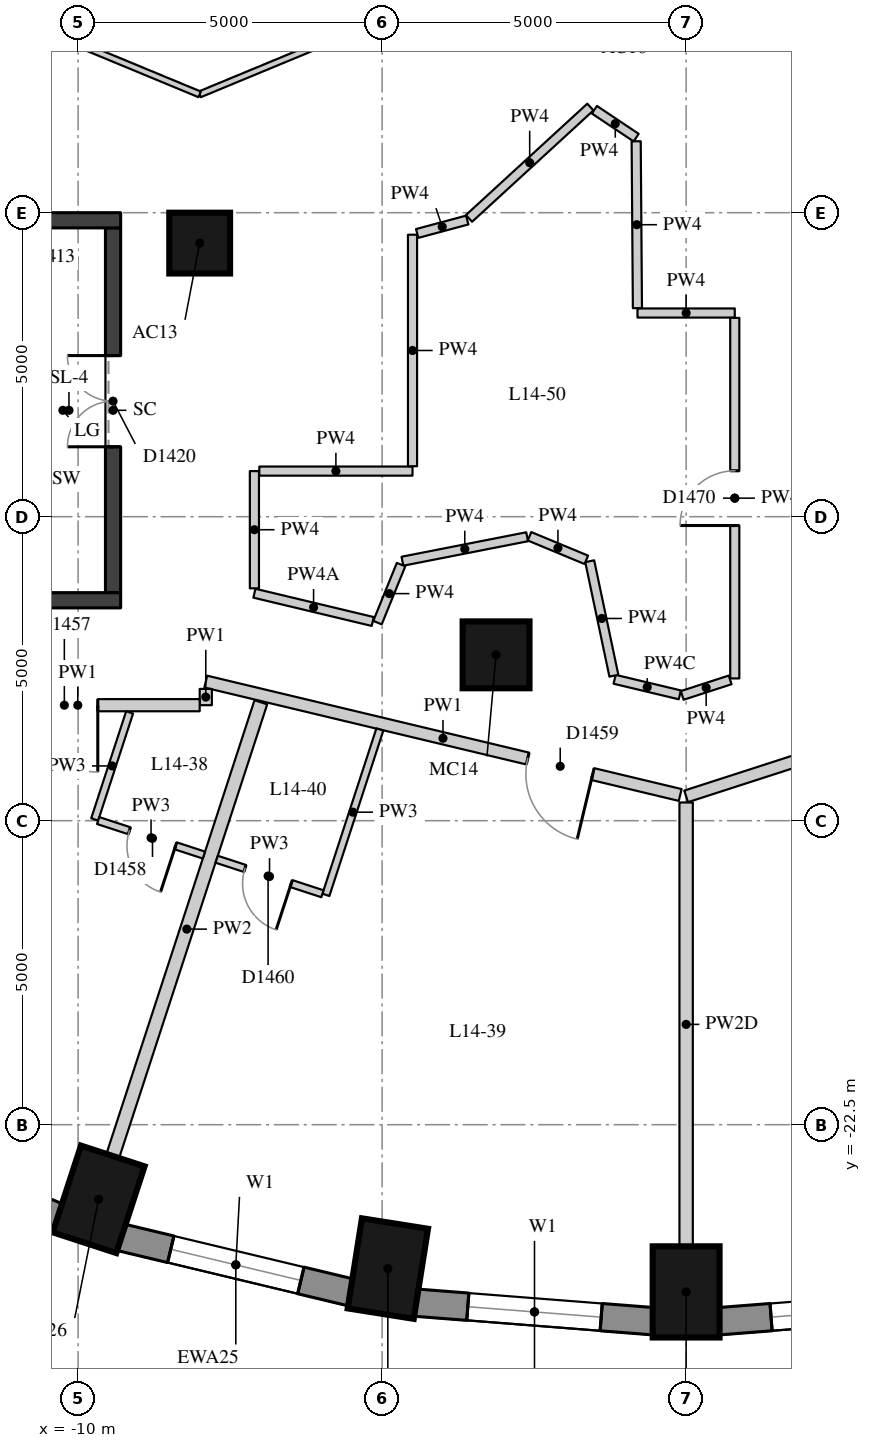
"""IFC4 building model, lengths in metres.
Left out: names, types, materials, properties, quantities, classifications, styles, units other than length and angle.
Written with IfcOpenShell. Run it as: python <this file> out.ifc"""

import sys

from ifc_helpers import new_model, si_unit, direction, frame, frame_2d, origin, origin_2d, place, context, subcontext, project, spatial, rectangle, extrude, element, fill, save


model = new_model("IFC4")
c1 = context("Model", 3, precision=1e-05, world=origin(), true_north=direction((0.0, 1.0)))
c2 = subcontext(c1, "Body", "Model", "MODEL_VIEW")
j1 = project(units=[si_unit("LENGTHUNIT", "METRE"), si_unit("PLANEANGLEUNIT", "RADIAN")], contexts=[c1])
p1 = place(None, origin())
s1 = spatial("IfcSite", under=j1, at=p1, CompositionType="ELEMENT")
p2 = place(p1, origin())
s2 = spatial("IfcBuilding", under=s1, at=p2, CompositionType="ELEMENT")
p3 = place(p2, frame((0.0, 0.0, 54.7)))
s3 = spatial("IfcBuildingStorey", under=s2, at=p3, CompositionType="ELEMENT", Elevation=54.7)
for number, where, z_axis, x_axis in (
    (1, (-9.662, -23.727, 0.0), (0.0, 0.0, 1.0), (-0.31, -0.951, 0.0)),
    (2, (-4.906, -24.866, 0.0), (0.0, 0.0, 1.0), (-0.156, -0.988, 0.0)),
    (3, (0.0, -25.25, 0.0), (0.0, 0.0, 1.0), (0.0, -1.0, 0.0)),
):
    element("IfcColumn", number, at=place(p3, frame(where, z_axis=z_axis, x_axis=x_axis)), inside=s3, PredefinedType="COLUMN", context=c2, shape_type="SweptSolid", body=[
        extrude(rectangle(XDim=1.5, YDim=1.1, at=origin_2d()), origin(), (0.0, 0.0, 1.0), 3.3),
    ])
p4 = place(p3, frame((-8.0, -8.0, 0.0), z_axis=(0.0, 0.0, 1.0), x_axis=(1.0, 0.0, 0.0)))
e4 = element("IfcColumn", 4, at=p4, inside=s3, PredefinedType="COLUMN", context=c2, shape_type="SweptSolid", body=[
    extrude(rectangle(XDim=1.0, YDim=1.0, at=origin_2d()), origin(), (0.0, 0.0, 1.0), 3.3),
])
p5 = place(p3, frame((-3.126, -14.772, 0.0), z_axis=(0.0, 0.0, 1.0), x_axis=(1.0, 0.0, 0.0)))
e5 = element("IfcColumn", 5, at=p5, inside=s3, PredefinedType="COLUMN", context=c2, shape_type="SweptSolid", body=[
    extrude(rectangle(XDim=1.1, YDim=1.1, at=origin_2d()), origin(), (0.0, 0.0, 1.0), 3.3),
])
p6 = place(p3, frame((-13.875, -22.537, 0.0), z_axis=(0.0, 0.0, 1.0), x_axis=(0.923031964282, -0.384723267966, 0.0)))
e6 = element("IfcWall", 6, at=p6, inside=s3, PredefinedType="SOLIDWALL", context=c2, shape_type="SweptSolid", body=[
    extrude(rectangle(XDim=3.856, YDim=0.45, at=frame_2d((1.928, 0.0))), origin(), (0.0, 0.0, 1.0), 3.02),
])
p7 = place(p6, frame((0.828, 0.0, 0.4)))
e7 = element("IfcOpeningElement", 7, at=p7, cuts=e6, PredefinedType="OPENING", context=c2, shape_type="SweptSolid", body=[
    extrude(rectangle(XDim=2.2, YDim=1.75, at=frame_2d((1.1, 0.875))), frame((0.0, 0.235, 0.0), z_axis=(0.0, -1.0, 0.0), x_axis=(1.0, 0.0, 0.0)), (0.0, 0.0, 1.0), 0.47),
])
p8 = place(p3, frame((-9.308, -24.35, 0.0), z_axis=(0.0, 0.0, 1.0), x_axis=(0.972496561493, -0.232917233979, 0.0)))
e8 = element("IfcWall", 8, at=p8, inside=s3, PredefinedType="SOLIDWALL", context=c2, shape_type="SweptSolid", body=[
    extrude(rectangle(XDim=3.911, YDim=0.45, at=frame_2d((1.956, 0.0))), origin(), (0.0, 0.0, 1.0), 3.02),
])
p9 = place(p8, frame((0.855, 0.0, 0.4)))
e9 = element("IfcOpeningElement", 9, at=p9, cuts=e8, PredefinedType="OPENING", context=c2, shape_type="SweptSolid", body=[
    extrude(rectangle(XDim=2.2, YDim=1.75, at=frame_2d((1.1, 0.875))), frame((0.0, 0.235, 0.0), z_axis=(0.0, -1.0, 0.0), x_axis=(1.0, 0.0, 0.0)), (0.0, 0.0, 1.0), 0.47),
])
p10 = place(p3, frame((-4.457, -25.426, 0.0), z_axis=(0.0, 0.0, 1.0), x_axis=(0.996955972145, -0.077966592873, 0.0)))
e10 = element("IfcWall", 10, at=p10, inside=s3, PredefinedType="SOLIDWALL", context=c2, shape_type="SweptSolid", body=[
    extrude(rectangle(XDim=3.939, YDim=0.45, at=frame_2d((1.97, 0.0))), origin(), (0.0, 0.0, 1.0), 3.02),
])
p11 = place(p10, frame((0.87, 0.0, 0.4)))
e11 = element("IfcOpeningElement", 11, at=p11, cuts=e10, PredefinedType="OPENING", context=c2, shape_type="SweptSolid", body=[
    extrude(rectangle(XDim=2.2, YDim=1.75, at=frame_2d((1.1, 0.875))), frame((0.0, 0.235, 0.0), z_axis=(0.0, -1.0, 0.0), x_axis=(1.0, 0.0, 0.0)), (0.0, 0.0, 1.0), 0.47),
])
p12 = place(p3, frame((0.53, -25.733, 0.0), z_axis=(0.0, 0.0, 1.0), x_axis=(0.996955972145, 0.077966592873, 0.0)))
e12 = element("IfcWall", 12, at=p12, inside=s3, PredefinedType="SOLIDWALL", context=c2, shape_type="SweptSolid", body=[
    extrude(rectangle(XDim=3.939, YDim=0.45, at=frame_2d((1.97, 0.0))), origin(), (0.0, 0.0, 1.0), 3.02),
])
p13 = place(p12, frame((0.87, 0.0, 0.4)))
e13 = element("IfcOpeningElement", 13, at=p13, cuts=e12, PredefinedType="OPENING", context=c2, shape_type="SweptSolid", body=[
    extrude(rectangle(XDim=2.2, YDim=1.75, at=frame_2d((1.1, 0.875))), frame((0.0, 0.235, 0.0), z_axis=(0.0, -1.0, 0.0), x_axis=(1.0, 0.0, 0.0)), (0.0, 0.0, 1.0), 0.47),
])
p14 = place(p3, frame((-9.425, -13.75, -0.28), z_axis=(0.0, 0.0, 1.0), x_axis=(0.0, 1.0, 0.0)))
e14 = element("IfcWall", 14, at=p14, inside=s3, PredefinedType="SHEAR", context=c2, shape_type="SweptSolid", body=[
    extrude(rectangle(XDim=6.0, YDim=0.25, at=frame_2d((3.0, 0.0))), origin(), (0.0, 0.0, 1.0), 3.3),
])
p15 = place(p14, frame((2.4, 0.0, 0.28)))
e15 = element("IfcOpeningElement", 15, at=p15, cuts=e14, PredefinedType="OPENING", context=c2, shape_type="SweptSolid", body=[
    extrude(rectangle(XDim=1.5, YDim=2.1, at=frame_2d((0.75, 1.05))), frame((0.0, 0.135, 0.0), z_axis=(0.0, -1.0, 0.0), x_axis=(1.0, 0.0, 0.0)), (0.0, 0.0, 1.0), 0.27),
])
for number, where, z_axis, x_axis in (
    (16, (-14.5, -7.625, -0.28), (0.0, 0.0, 1.0), (1.0, 0.0, 0.0)),
    (17, (-14.5, -13.875, -0.28), (0.0, 0.0, 1.0), (1.0, 0.0, 0.0)),
):
    element("IfcWall", number, at=place(p3, frame(where, z_axis=z_axis, x_axis=x_axis)), inside=s3, PredefinedType="SHEAR", context=c2, shape_type="SweptSolid", body=[
        extrude(rectangle(XDim=5.2, YDim=0.25, at=frame_2d((2.6, 0.0))), origin(), (0.0, 0.0, 1.0), 3.3),
    ])
p16 = place(p3, frame((10.792, -13.612, 0.0), z_axis=(0.0, 0.0, 1.0), x_axis=(-0.951542928403, -0.307515943336, 0.0)))
e18 = element("IfcWall", 18, at=p16, inside=s3, PredefinedType="PARTITIONING", context=c2, shape_type="SweptSolid", body=[
    extrude(rectangle(XDim=11.342, YDim=0.2, at=frame_2d((5.671, 0.0))), origin(), (0.0, 0.0, 1.0), 3.02),
])
p17 = place(p16, frame((3.239, 0.0, 0.0)))
e19 = element("IfcOpeningElement", 19, at=p17, cuts=e18, PredefinedType="OPENING", context=c2, shape_type="SweptSolid", body=[
    extrude(rectangle(XDim=1.1, YDim=2.1, at=frame_2d((0.55, 1.05))), frame((0.0, 0.11, 0.0), z_axis=(0.0, -1.0, 0.0), x_axis=(1.0, 0.0, 0.0)), (0.0, 0.0, 1.0), 0.22),
])
p18 = place(p3, frame((-0.098, -17.077, 0.0), z_axis=(0.0, 0.0, 1.0), x_axis=(-0.972607318404, 0.232454305588, 0.0)))
e20 = element("IfcWall", 20, at=p18, inside=s3, PredefinedType="PARTITIONING", context=c2, shape_type="SweptSolid", body=[
    extrude(rectangle(XDim=8.022, YDim=0.2, at=frame_2d((4.011, 0.0))), origin(), (0.0, 0.0, 1.0), 3.02),
])
p19 = place(p18, frame((1.479, 0.0, 0.0)))
e21 = element("IfcOpeningElement", 21, at=p19, cuts=e20, PredefinedType="OPENING", context=c2, shape_type="SweptSolid", body=[
    extrude(rectangle(XDim=1.1, YDim=2.1, at=frame_2d((0.55, 1.05))), frame((0.0, 0.11, 0.0), z_axis=(0.0, -1.0, 0.0), x_axis=(1.0, 0.0, 0.0)), (0.0, 0.0, 1.0), 0.22),
])
p20 = place(p3, frame((-7.9, -15.332, 0.0), z_axis=(0.0, 0.0, 1.0), x_axis=(0.0, -1.0, 0.0)))
e22 = element("IfcWall", 22, at=p20, inside=s3, PredefinedType="PARTITIONING", context=c2, shape_type="SweptSolid", body=[
    extrude(rectangle(XDim=0.268, YDim=0.2, at=frame_2d((0.134, 0.0))), origin(), (0.0, 0.0, 1.0), 3.02),
])
p21 = place(p3, frame((-8.0, -15.6, 0.0), z_axis=(0.0, 0.0, 1.0), x_axis=(-1.0, 0.0, 0.0)))
e23 = element("IfcWall", 23, at=p21, inside=s3, PredefinedType="PARTITIONING", context=c2, shape_type="SweptSolid", body=[
    extrude(rectangle(XDim=4.009, YDim=0.2, at=frame_2d((2.005, 0.0))), origin(), (0.0, 0.0, 1.0), 3.02),
])
p22 = place(p21, frame((1.676, 0.0, 0.0)))
e24 = element("IfcOpeningElement", 24, at=p22, cuts=e23, PredefinedType="OPENING", context=c2, shape_type="SweptSolid", body=[
    extrude(rectangle(XDim=1.1, YDim=2.1, at=frame_2d((0.55, 1.05))), frame((0.0, 0.11, 0.0), z_axis=(0.0, -1.0, 0.0), x_axis=(1.0, 0.0, 0.0)), (0.0, 0.0, 1.0), 0.22),
])
p23 = place(p3, frame((-0.8, -9.15, 0.0), z_axis=(0.0, 0.0, 1.0), x_axis=(1.0, 0.0, 0.0)))
e25 = element("IfcWall", 25, at=p23, inside=s3, PredefinedType="PARTITIONING", context=c2, shape_type="SweptSolid", body=[
    extrude(rectangle(XDim=1.6, YDim=0.15, at=frame_2d((0.8, 0.0))), origin(), (0.0, 0.0, 1.0), 3.02),
])
p24 = place(p3, frame((0.8, -9.23, 0.0), z_axis=(0.0, 0.0, 1.0), x_axis=(0.0, -1.0, 0.0)))
e26 = element("IfcWall", 26, at=p24, inside=s3, PredefinedType="PARTITIONING", context=c2, shape_type="SweptSolid", body=[
    extrude(rectangle(XDim=5.93, YDim=0.15, at=frame_2d((2.965, 0.0))), origin(), (0.0, 0.0, 1.0), 3.02),
])
p25 = place(p24, frame((2.515, 0.0, 0.0)))
e27 = element("IfcOpeningElement", 27, at=p25, cuts=e26, PredefinedType="OPENING", context=c2, shape_type="SweptSolid", body=[
    extrude(rectangle(XDim=0.9, YDim=2.1, at=frame_2d((0.45, 1.05))), frame((0.0, 0.085, 0.0), z_axis=(0.0, -1.0, 0.0), x_axis=(1.0, 0.0, 0.0)), (0.0, 0.0, 1.0), 0.17),
])
p26 = place(p3, frame((0.724, -15.184, 0.0), z_axis=(0.0, 0.0, 1.0), x_axis=(-0.951444518554, -0.307820285415, 0.0)))
e28 = element("IfcWall", 28, at=p26, inside=s3, PredefinedType="PARTITIONING", context=c2, shape_type="SweptSolid", body=[
    extrude(rectangle(XDim=0.829, YDim=0.15, at=frame_2d((0.415, 0.0))), origin(), (0.0, 0.0, 1.0), 3.02),
])
p27 = place(p3, frame((-0.104, -15.43, 0.0), z_axis=(0.0, 0.0, 1.0), x_axis=(-0.972630060885, 0.232359128642, 0.0)))
e29 = element("IfcWall", 29, at=p27, inside=s3, PredefinedType="PARTITIONING", context=c2, shape_type="SweptSolid", body=[
    extrude(rectangle(XDim=1.102, YDim=0.15, at=frame_2d((0.551, 0.0))), origin(), (0.0, 0.0, 1.0), 2.42),
])
p28 = place(p3, frame((-1.188, -15.115, 0.0), z_axis=(0.0, 0.0, 1.0), x_axis=(-0.20649628494, 0.978447384536, 0.0)))
e30 = element("IfcWall", 30, at=p28, inside=s3, PredefinedType="PARTITIONING", context=c2, shape_type="SweptSolid", body=[
    extrude(rectangle(XDim=1.925, YDim=0.15, at=frame_2d((0.962, 0.0))), origin(), (0.0, 0.0, 1.0), 3.02),
])
p29 = place(p3, frame((-1.641, -13.209, 0.0), z_axis=(0.0, 0.0, 1.0), x_axis=(-0.923725449546, 0.383055209937, 0.0)))
e31 = element("IfcWall", 31, at=p29, inside=s3, PredefinedType="PARTITIONING", context=c2, shape_type="SweptSolid", body=[
    extrude(rectangle(XDim=1.011, YDim=0.15, at=frame_2d((0.506, 0.0))), origin(), (0.0, 0.0, 1.0), 3.02),
])
p30 = place(p3, frame((-2.615, -12.83, 0.0), z_axis=(0.0, 0.0, 1.0), x_axis=(-0.981297312652, -0.192498270593, 0.0)))
e32 = element("IfcWall", 32, at=p30, inside=s3, PredefinedType="PARTITIONING", context=c2, shape_type="SweptSolid", body=[
    extrude(rectangle(XDim=2.09, YDim=0.15, at=frame_2d((1.045, 0.0))), origin(), (0.0, 0.0, 1.0), 3.02),
])
p31 = place(p3, frame((-4.688, -13.288, 0.0), z_axis=(0.0, 0.0, 1.0), x_axis=(-0.375963709287, -0.926634388148, 0.0)))
e33 = element("IfcWall", 33, at=p31, inside=s3, PredefinedType="PARTITIONING", context=c2, shape_type="SweptSolid", body=[
    extrude(rectangle(XDim=1.03, YDim=0.15, at=frame_2d((0.515, 0.0))), origin(), (0.0, 0.0, 1.0), 3.02),
])
p32 = place(p3, frame((-5.154, -14.224, 0.0), z_axis=(0.0, 0.0, 1.0), x_axis=(-0.97258848944, 0.232533073366, 0.0)))
e34 = element("IfcWall", 34, at=p32, inside=s3, PredefinedType="PARTITIONING", context=c2, shape_type="SweptSolid", body=[
    extrude(rectangle(XDim=2.001, YDim=0.15, at=frame_2d((1.0, 0.0))), origin(), (0.0, 0.0, 1.0), 2.57),
])
p33 = place(p3, frame((-7.1, -13.678, 0.0), z_axis=(0.0, 0.0, 1.0), x_axis=(0.0, 1.0, 0.0)))
e35 = element("IfcWall", 35, at=p33, inside=s3, PredefinedType="PARTITIONING", context=c2, shape_type="SweptSolid", body=[
    extrude(rectangle(XDim=1.928, YDim=0.15, at=frame_2d((0.964, 0.0))), origin(), (0.0, 0.0, 1.0), 3.02),
])
p34 = place(p3, frame((-7.02, -11.75, 0.0), z_axis=(0.0, 0.0, 1.0), x_axis=(1.0, 0.0, 0.0)))
e36 = element("IfcWall", 36, at=p34, inside=s3, PredefinedType="PARTITIONING", context=c2, shape_type="SweptSolid", body=[
    extrude(rectangle(XDim=2.52, YDim=0.15, at=frame_2d((1.26, 0.0))), origin(), (0.0, 0.0, 1.0), 3.02),
])
p35 = place(p3, frame((-4.5, -11.67, 0.0), z_axis=(0.0, 0.0, 1.0), x_axis=(0.0, 1.0, 0.0)))
e37 = element("IfcWall", 37, at=p35, inside=s3, PredefinedType="PARTITIONING", context=c2, shape_type="SweptSolid", body=[
    extrude(rectangle(XDim=3.808, YDim=0.15, at=frame_2d((1.904, 0.0))), origin(), (0.0, 0.0, 1.0), 3.02),
])
p36 = place(p3, frame((-4.423, -7.842, 0.0), z_axis=(0.0, 0.0, 1.0), x_axis=(0.965853333569, 0.259089440221, 0.0)))
e38 = element("IfcWall", 38, at=p36, inside=s3, PredefinedType="PARTITIONING", context=c2, shape_type="SweptSolid", body=[
    extrude(rectangle(XDim=0.852, YDim=0.15, at=frame_2d((0.426, 0.0))), origin(), (0.0, 0.0, 1.0), 3.02),
])
p37 = place(p3, frame((-3.571, -7.594, 0.0), z_axis=(0.0, 0.0, 1.0), x_axis=(0.736783660812, 0.676128565555, 0.0)))
e39 = element("IfcWall", 39, at=p37, inside=s3, PredefinedType="PARTITIONING", context=c2, shape_type="SweptSolid", body=[
    extrude(rectangle(XDim=2.709, YDim=0.15, at=frame_2d((1.354, 0.0))), origin(), (0.0, 0.0, 1.0), 3.02),
])
p38 = place(p3, frame((-1.509, -5.806, 0.0), z_axis=(0.0, 0.0, 1.0), x_axis=(0.831367153095, -0.55572354346, 0.0)))
e40 = element("IfcWall", 40, at=p38, inside=s3, PredefinedType="PARTITIONING", context=c2, shape_type="SweptSolid", body=[
    extrude(rectangle(XDim=0.825, YDim=0.15, at=frame_2d((0.413, 0.0))), origin(), (0.0, 0.0, 1.0), 3.02),
])
p39 = place(p3, frame((-0.822, -6.325, 0.0), z_axis=(0.0, 0.0, 1.0), x_axis=(0.007471771501, -0.999972085926, 0.0)))
e41 = element("IfcWall", 41, at=p39, inside=s3, PredefinedType="PARTITIONING", context=c2, shape_type="SweptSolid", body=[
    extrude(rectangle(XDim=2.745, YDim=0.15, at=frame_2d((1.372, 0.0))), origin(), (0.0, 0.0, 1.0), 3.02),
])
p40 = place(p3, frame((-9.429, -23.014, 0.0), z_axis=(0.0, 0.0, 1.0), x_axis=(0.310249775859, 0.950655077607, 0.0)))
e42 = element("IfcWall", 42, at=p40, inside=s3, PredefinedType="PARTITIONING", context=c2, shape_type="SweptSolid", body=[
    extrude(rectangle(XDim=7.85, YDim=0.22, at=frame_2d((3.925, 0.0))), origin(), (0.0, 0.0, 1.0), 3.02),
])
p41 = place(p3, frame((0.0, -24.5, 0.0), z_axis=(0.0, 0.0, 1.0), x_axis=(0.0, 1.0, 0.0)))
e43 = element("IfcWall", 43, at=p41, inside=s3, PredefinedType="PARTITIONING", context=c2, shape_type="SweptSolid", body=[
    extrude(rectangle(XDim=7.3, YDim=0.22, at=frame_2d((3.65, 0.0))), origin(), (0.0, 0.0, 1.0), 2.47),
])
p42 = place(p3, frame((-9.153, -15.719, 0.0), z_axis=(0.0, 0.0, 1.0), x_axis=(-0.310326382186, -0.950630073435, 0.0)))
e44 = element("IfcWall", 44, at=p42, inside=s3, PredefinedType="PARTITIONING", context=c2, shape_type="SweptSolid", body=[
    extrude(rectangle(XDim=1.851, YDim=0.12, at=frame_2d((0.926, 0.0))), origin(), (0.0, 0.0, 1.0), 3.02),
])
p43 = place(p3, frame((-5.037, -15.999, 0.0), z_axis=(0.0, 0.0, 1.0), x_axis=(-0.310181518973, -0.950677350781, 0.0)))
e45 = element("IfcWall", 45, at=p43, inside=s3, PredefinedType="PARTITIONING", context=c2, shape_type="SweptSolid", body=[
    extrude(rectangle(XDim=2.862, YDim=0.12, at=frame_2d((1.431, 0.0))), origin(), (0.0, 0.0, 1.0), 3.02),
])
p44 = place(p3, frame((-9.67, -17.498, 0.0), z_axis=(0.0, 0.0, 1.0), x_axis=(0.950678536911, -0.31017788357, 0.0)))
e46 = element("IfcWall", 46, at=p44, inside=s3, PredefinedType="PARTITIONING", context=c2, shape_type="SweptSolid", body=[
    extrude(rectangle(XDim=1.83, YDim=0.12, at=frame_2d((0.915, 0.0))), origin(), (0.0, 0.0, 1.0), 3.02),
])
p45 = place(p44, frame((0.54, 0.0, 0.0)))
e47 = element("IfcOpeningElement", 47, at=p45, cuts=e46, PredefinedType="OPENING", context=c2, shape_type="SweptSolid", body=[
    extrude(rectangle(XDim=0.8, YDim=2.1, at=frame_2d((0.4, 1.05))), frame((0.0, 0.07, 0.0), z_axis=(0.0, -1.0, 0.0), x_axis=(1.0, 0.0, 0.0)), (0.0, 0.0, 1.0), 0.14),
])
p46 = place(p3, frame((-5.981, -18.701, 0.0), z_axis=(0.0, 0.0, 1.0), x_axis=(-0.950639191072, 0.310298450524, 0.0)))
e48 = element("IfcWall", 48, at=p46, inside=s3, PredefinedType="PARTITIONING", context=c2, shape_type="SweptSolid", body=[
    extrude(rectangle(XDim=1.83, YDim=0.12, at=frame_2d((0.915, 0.0))), origin(), (0.0, 0.0, 1.0), 3.02),
])
p47 = place(p46, frame((0.54, 0.0, 0.0)))
e49 = element("IfcOpeningElement", 49, at=p47, cuts=e48, PredefinedType="OPENING", context=c2, shape_type="SweptSolid", body=[
    extrude(rectangle(XDim=0.8, YDim=2.1, at=frame_2d((0.4, 1.05))), frame((0.0, 0.07, 0.0), z_axis=(0.0, -1.0, 0.0), x_axis=(1.0, 0.0, 0.0)), (0.0, 0.0, 1.0), 0.14),
])
for number, where, z_axis, x_axis in (
    (50, (-4.073, -3.927, 0.0), (0.0, 0.0, 1.0), (-0.924, -0.383, 0.0)),
    (51, (-8.0, -5.554, 0.0), (0.0, 0.0, 1.0), (-0.924, 0.383, 0.0)),
):
    element("IfcWall", number, at=place(p3, frame(where, z_axis=z_axis, x_axis=x_axis)), inside=s3, PredefinedType="PARTITIONING", context=c2, shape_type="SweptSolid", body=[
        extrude(rectangle(XDim=4.251, YDim=0.1, at=frame_2d((2.125, 0.0))), origin(), (0.0, 0.0, 1.0), 3.02),
    ])
p48 = place(p9, origin())
e52 = element("IfcWindow", 52, at=p48, inside=s3, PartitioningType="SINGLE_PANEL", PredefinedType="WINDOW", context=c2, shape_type="SweptSolid", body=[
    extrude(rectangle(XDim=2.2, YDim=1.75, at=frame_2d((1.1, 0.875))), frame((0.0, 0.035, 0.0), z_axis=(0.0, -1.0, 0.0), x_axis=(1.0, 0.0, 0.0)), (0.0, 0.0, 1.0), 0.06),
])
fill(e9, e52)
p49 = place(p11, origin())
e53 = element("IfcWindow", 53, at=p49, inside=s3, PartitioningType="SINGLE_PANEL", PredefinedType="WINDOW", context=c2, shape_type="SweptSolid", body=[
    extrude(rectangle(XDim=2.2, YDim=1.75, at=frame_2d((1.1, 0.875))), frame((0.0, 0.035, 0.0), z_axis=(0.0, -1.0, 0.0), x_axis=(1.0, 0.0, 0.0)), (0.0, 0.0, 1.0), 0.06),
])
fill(e11, e53)
p50 = place(p13, origin())
e54 = element("IfcWindow", 54, at=p50, inside=s3, PartitioningType="SINGLE_PANEL", PredefinedType="WINDOW", context=c2, shape_type="SweptSolid", body=[
    extrude(rectangle(XDim=2.2, YDim=1.75, at=frame_2d((1.1, 0.875))), frame((0.0, 0.035, 0.0), z_axis=(0.0, -1.0, 0.0), x_axis=(1.0, 0.0, 0.0)), (0.0, 0.0, 1.0), 0.06),
])
fill(e13, e54)
p51 = place(p15, origin())
e55 = element("IfcDoor", 55, at=p51, inside=s3, OperationType="DOUBLE_DOOR_SINGLE_SWING", PredefinedType="DOOR", context=c2, shape_type="SweptSolid", body=[
    extrude(rectangle(XDim=1.5, YDim=2.1, at=frame_2d((0.75, 1.05))), frame((0.0, 0.025, 0.0), z_axis=(0.0, -1.0, 0.0), x_axis=(1.0, 0.0, 0.0)), (0.0, 0.0, 1.0), 0.05),
])
fill(e15, e55)
p52 = place(p22, origin())
e56 = element("IfcDoor", 56, at=p52, inside=s3, OperationType="SINGLE_SWING_LEFT", PredefinedType="DOOR", context=c2, shape_type="SweptSolid", body=[
    extrude(rectangle(XDim=1.1, YDim=2.1, at=frame_2d((0.55, 1.05))), frame((0.0, 0.025, 0.0), z_axis=(0.0, -1.0, 0.0), x_axis=(1.0, 0.0, 0.0)), (0.0, 0.0, 1.0), 0.05),
])
fill(e24, e56)
p53 = place(p45, origin())
e57 = element("IfcDoor", 57, at=p53, inside=s3, OperationType="SINGLE_SWING_LEFT", PredefinedType="DOOR", context=c2, shape_type="SweptSolid", body=[
    extrude(rectangle(XDim=0.8, YDim=2.1, at=frame_2d((0.4, 1.05))), frame((0.0, 0.025, 0.0), z_axis=(0.0, -1.0, 0.0), x_axis=(1.0, 0.0, 0.0)), (0.0, 0.0, 1.0), 0.05),
])
fill(e47, e57)
p54 = place(p19, origin())
e58 = element("IfcDoor", 58, at=p54, inside=s3, OperationType="SINGLE_SWING_LEFT", PredefinedType="DOOR", context=c2, shape_type="SweptSolid", body=[
    extrude(rectangle(XDim=1.1, YDim=2.1, at=frame_2d((0.55, 1.05))), frame((0.0, 0.025, 0.0), z_axis=(0.0, -1.0, 0.0), x_axis=(1.0, 0.0, 0.0)), (0.0, 0.0, 1.0), 0.05),
])
fill(e21, e58)
p55 = place(p47, origin())
e59 = element("IfcDoor", 59, at=p55, inside=s3, OperationType="SINGLE_SWING_LEFT", PredefinedType="DOOR", context=c2, shape_type="SweptSolid", body=[
    extrude(rectangle(XDim=0.8, YDim=2.1, at=frame_2d((0.4, 1.05))), frame((0.0, 0.025, 0.0), z_axis=(0.0, -1.0, 0.0), x_axis=(1.0, 0.0, 0.0)), (0.0, 0.0, 1.0), 0.05),
])
fill(e49, e59)
p56 = place(p25, origin())
e60 = element("IfcDoor", 60, at=p56, inside=s3, OperationType="SINGLE_SWING_LEFT", PredefinedType="DOOR", context=c2, shape_type="SweptSolid", body=[
    extrude(rectangle(XDim=0.9, YDim=2.1, at=frame_2d((0.45, 1.05))), frame((0.0, 0.025, 0.0), z_axis=(0.0, -1.0, 0.0), x_axis=(1.0, 0.0, 0.0)), (0.0, 0.0, 1.0), 0.05),
])
fill(e27, e60)
save(model, sys.argv[1])
